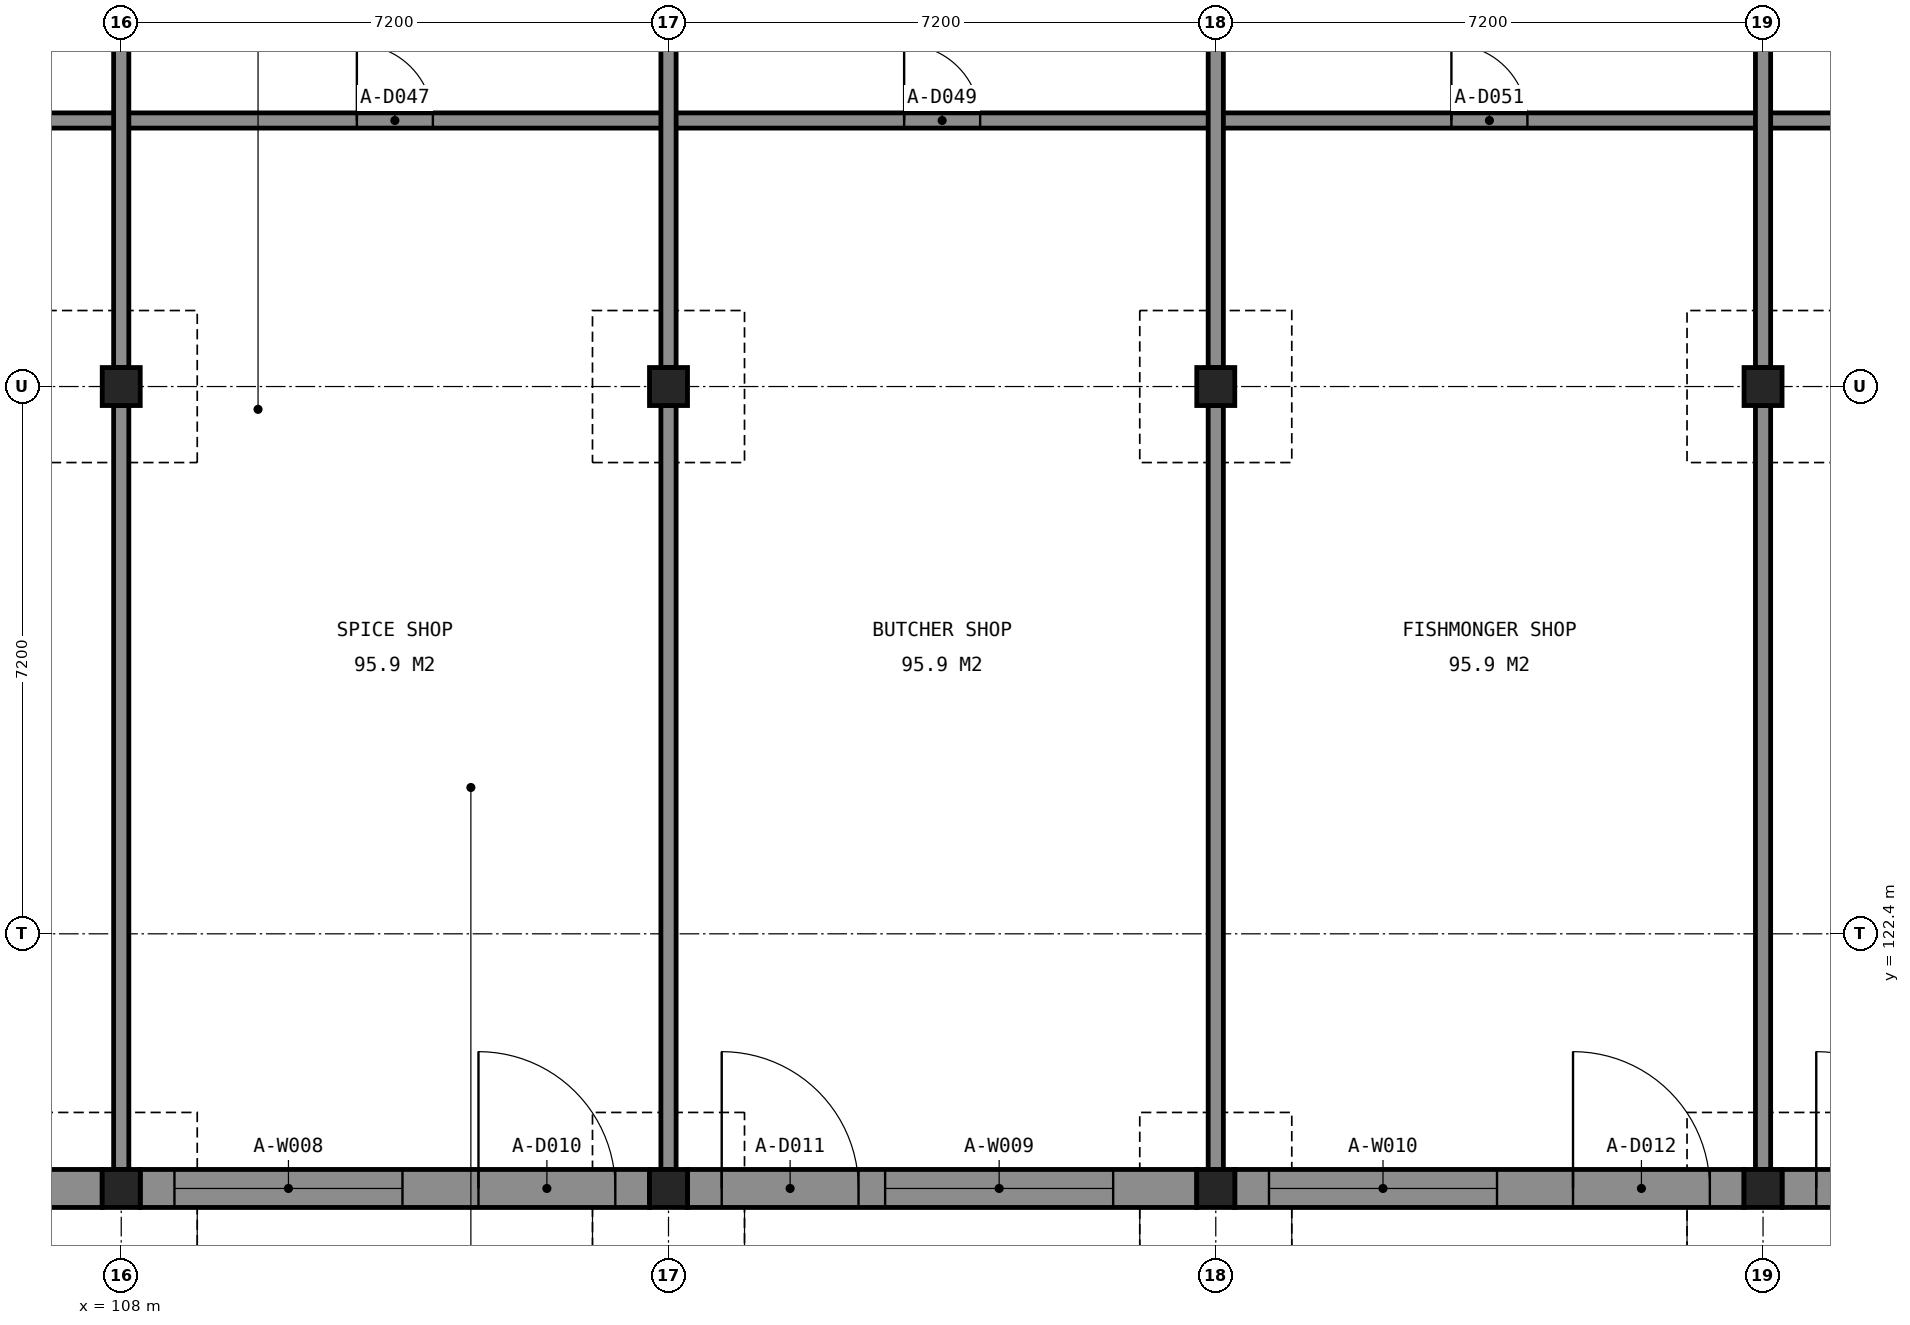
"""IFC4 building model, lengths in metres.
Left out: names, types, materials, properties, quantities, classifications, styles, units other than length and angle.
Written with IfcOpenShell. Run it as: python <this file> out.ifc"""

import sys

from ifc_helpers import new_model, si_unit, direction, frame, frame_2d, origin, origin_2d, place, context, subcontext, project, spatial, rectangle, extrude, element, fill, save


model = new_model("IFC4")
c1 = context("Model", 3, precision=1e-05, world=origin(), true_north=direction((0.0, 1.0)))
c2 = subcontext(c1, "Body", "Model", "MODEL_VIEW")
j1 = project(units=[si_unit("LENGTHUNIT", "METRE"), si_unit("PLANEANGLEUNIT", "RADIAN")], contexts=[c1])
p1 = place(None, origin())
s1 = spatial("IfcSite", under=j1, at=p1, CompositionType="ELEMENT")
p2 = place(p1, origin())
s2 = spatial("IfcBuilding", under=s1, at=p2, CompositionType="ELEMENT")
p3 = place(p2, origin())
s3 = spatial("IfcBuildingStorey", under=s2, at=p3, CompositionType="ELEMENT", Elevation=0.0)
for number, where, z_axis, x_axis in (
    (1, (108.0, 119.05, 0.0), (0.0, 0.0, 1.0), (1.0, 0.0, 0.0)),
    (2, (115.2, 119.05, 0.0), (0.0, 0.0, 1.0), (1.0, 0.0, 0.0)),
    (3, (122.4, 119.05, 0.0), (0.0, 0.0, 1.0), (1.0, 0.0, 0.0)),
    (4, (129.6, 119.05, 0.0), (0.0, 0.0, 1.0), (1.0, 0.0, 0.0)),
    (5, (108.0, 129.6, 0.0), (0.0, 0.0, 1.0), (1.0, 0.0, 0.0)),
    (6, (115.2, 129.6, 0.0), (0.0, 0.0, 1.0), (1.0, 0.0, 0.0)),
    (7, (122.4, 129.6, 0.0), (0.0, 0.0, 1.0), (1.0, 0.0, 0.0)),
    (8, (129.6, 129.6, 0.0), (0.0, 0.0, 1.0), (1.0, 0.0, 0.0)),
):
    element("IfcColumn", number, at=place(p3, frame(where, z_axis=z_axis, x_axis=x_axis)), inside=s3, PredefinedType="COLUMN", context=c2, shape_type="SweptSolid", body=[
        extrude(rectangle(XDim=0.5, YDim=0.5, at=origin_2d()), origin(), (0.0, 0.0, 1.0), 3.7),
    ])
p4 = place(p3, frame((101.05, 119.05, 0.0), z_axis=(0.0, 0.0, 1.0), x_axis=(1.0, 0.0, 0.0)))
e9 = element("IfcWall", 9, at=p4, inside=s3, PredefinedType="SOLIDWALL", context=c2, shape_type="SweptSolid", body=[
    extrude(rectangle(XDim=6.7, YDim=0.5, at=frame_2d((3.35, 0.0))), origin(), (0.0, 0.0, 1.0), 3.6),
])
p5 = place(p4, frame((0.45, 0.0, 0.0)))
e10 = element("IfcOpeningElement", 10, at=p5, cuts=e9, PredefinedType="OPENING", context=c2, shape_type="SweptSolid", body=[
    extrude(rectangle(XDim=1.8, YDim=2.4, at=frame_2d((0.9, 1.2))), frame((0.0, 0.26, 0.0), z_axis=(0.0, -1.0, 0.0), x_axis=(1.0, 0.0, 0.0)), (0.0, 0.0, 1.0), 0.52),
])
p6 = place(p4, frame((2.6, 0.0, 0.6)))
e11 = element("IfcOpeningElement", 11, at=p6, cuts=e9, PredefinedType="OPENING", context=c2, shape_type="SweptSolid", body=[
    extrude(rectangle(XDim=3.0, YDim=2.4, at=frame_2d((1.5, 1.2))), frame((0.0, 0.26, 0.0), z_axis=(0.0, -1.0, 0.0), x_axis=(1.0, 0.0, 0.0)), (0.0, 0.0, 1.0), 0.52),
])
p7 = place(p3, frame((108.25, 119.05, 0.0), z_axis=(0.0, 0.0, 1.0), x_axis=(1.0, 0.0, 0.0)))
e12 = element("IfcWall", 12, at=p7, inside=s3, PredefinedType="SOLIDWALL", context=c2, shape_type="SweptSolid", body=[
    extrude(rectangle(XDim=6.7, YDim=0.5, at=frame_2d((3.35, 0.0))), origin(), (0.0, 0.0, 1.0), 3.6),
])
p8 = place(p7, frame((4.45, 0.0, 0.0)))
e13 = element("IfcOpeningElement", 13, at=p8, cuts=e12, PredefinedType="OPENING", context=c2, shape_type="SweptSolid", body=[
    extrude(rectangle(XDim=1.8, YDim=2.4, at=frame_2d((0.9, 1.2))), frame((0.0, 0.26, 0.0), z_axis=(0.0, -1.0, 0.0), x_axis=(1.0, 0.0, 0.0)), (0.0, 0.0, 1.0), 0.52),
])
p9 = place(p7, frame((0.45, 0.0, 0.6)))
e14 = element("IfcOpeningElement", 14, at=p9, cuts=e12, PredefinedType="OPENING", context=c2, shape_type="SweptSolid", body=[
    extrude(rectangle(XDim=3.0, YDim=2.4, at=frame_2d((1.5, 1.2))), frame((0.0, 0.26, 0.0), z_axis=(0.0, -1.0, 0.0), x_axis=(1.0, 0.0, 0.0)), (0.0, 0.0, 1.0), 0.52),
])
p10 = place(p3, frame((115.45, 119.05, 0.0), z_axis=(0.0, 0.0, 1.0), x_axis=(1.0, 0.0, 0.0)))
e15 = element("IfcWall", 15, at=p10, inside=s3, PredefinedType="SOLIDWALL", context=c2, shape_type="SweptSolid", body=[
    extrude(rectangle(XDim=6.7, YDim=0.5, at=frame_2d((3.35, 0.0))), origin(), (0.0, 0.0, 1.0), 3.6),
])
p11 = place(p10, frame((0.45, 0.0, 0.0)))
e16 = element("IfcOpeningElement", 16, at=p11, cuts=e15, PredefinedType="OPENING", context=c2, shape_type="SweptSolid", body=[
    extrude(rectangle(XDim=1.8, YDim=2.4, at=frame_2d((0.9, 1.2))), frame((0.0, 0.26, 0.0), z_axis=(0.0, -1.0, 0.0), x_axis=(1.0, 0.0, 0.0)), (0.0, 0.0, 1.0), 0.52),
])
p12 = place(p10, frame((2.6, 0.0, 0.6)))
e17 = element("IfcOpeningElement", 17, at=p12, cuts=e15, PredefinedType="OPENING", context=c2, shape_type="SweptSolid", body=[
    extrude(rectangle(XDim=3.0, YDim=2.4, at=frame_2d((1.5, 1.2))), frame((0.0, 0.26, 0.0), z_axis=(0.0, -1.0, 0.0), x_axis=(1.0, 0.0, 0.0)), (0.0, 0.0, 1.0), 0.52),
])
p13 = place(p3, frame((122.65, 119.05, 0.0), z_axis=(0.0, 0.0, 1.0), x_axis=(1.0, 0.0, 0.0)))
e18 = element("IfcWall", 18, at=p13, inside=s3, PredefinedType="SOLIDWALL", context=c2, shape_type="SweptSolid", body=[
    extrude(rectangle(XDim=6.7, YDim=0.5, at=frame_2d((3.35, 0.0))), origin(), (0.0, 0.0, 1.0), 3.6),
])
p14 = place(p13, frame((4.45, 0.0, 0.0)))
e19 = element("IfcOpeningElement", 19, at=p14, cuts=e18, PredefinedType="OPENING", context=c2, shape_type="SweptSolid", body=[
    extrude(rectangle(XDim=1.8, YDim=2.4, at=frame_2d((0.9, 1.2))), frame((0.0, 0.26, 0.0), z_axis=(0.0, -1.0, 0.0), x_axis=(1.0, 0.0, 0.0)), (0.0, 0.0, 1.0), 0.52),
])
p15 = place(p13, frame((0.45, 0.0, 0.6)))
e20 = element("IfcOpeningElement", 20, at=p15, cuts=e18, PredefinedType="OPENING", context=c2, shape_type="SweptSolid", body=[
    extrude(rectangle(XDim=3.0, YDim=2.4, at=frame_2d((1.5, 1.2))), frame((0.0, 0.26, 0.0), z_axis=(0.0, -1.0, 0.0), x_axis=(1.0, 0.0, 0.0)), (0.0, 0.0, 1.0), 0.52),
])
p16 = place(p3, frame((129.85, 119.05, 0.0), z_axis=(0.0, 0.0, 1.0), x_axis=(1.0, 0.0, 0.0)))
e21 = element("IfcWall", 21, at=p16, inside=s3, PredefinedType="SOLIDWALL", context=c2, shape_type="SweptSolid", body=[
    extrude(rectangle(XDim=6.7, YDim=0.5, at=frame_2d((3.35, 0.0))), origin(), (0.0, 0.0, 1.0), 3.6),
])
p17 = place(p16, frame((0.45, 0.0, 0.0)))
e22 = element("IfcOpeningElement", 22, at=p17, cuts=e21, PredefinedType="OPENING", context=c2, shape_type="SweptSolid", body=[
    extrude(rectangle(XDim=1.8, YDim=2.4, at=frame_2d((0.9, 1.2))), frame((0.0, 0.26, 0.0), z_axis=(0.0, -1.0, 0.0), x_axis=(1.0, 0.0, 0.0)), (0.0, 0.0, 1.0), 0.52),
])
p18 = place(p16, frame((2.6, 0.0, 0.6)))
e23 = element("IfcOpeningElement", 23, at=p18, cuts=e21, PredefinedType="OPENING", context=c2, shape_type="SweptSolid", body=[
    extrude(rectangle(XDim=3.0, YDim=2.4, at=frame_2d((1.5, 1.2))), frame((0.0, 0.26, 0.0), z_axis=(0.0, -1.0, 0.0), x_axis=(1.0, 0.0, 0.0)), (0.0, 0.0, 1.0), 0.52),
])
p19 = place(p3, frame((57.7, 133.1, 0.0), z_axis=(0.0, 0.0, 1.0), x_axis=(1.0, 0.0, 0.0)))
e24 = element("IfcWall", 24, at=p19, inside=s3, PredefinedType="PARTITIONING", context=c2, shape_type="SweptSolid", body=[
    extrude(rectangle(XDim=86.2, YDim=0.2, at=frame_2d((43.1, 0.0))), origin(), (0.0, 0.0, 1.0), 3.5),
])
p20 = place(p19, frame((3.0, 0.0, 0.0)))
e25 = element("IfcOpeningElement", 25, at=p20, cuts=e24, PredefinedType="OPENING", context=c2, shape_type="SweptSolid", body=[
    extrude(rectangle(XDim=1.0, YDim=2.1, at=frame_2d((0.5, 1.05))), frame((0.0, 0.11, 0.0), z_axis=(0.0, -1.0, 0.0), x_axis=(1.0, 0.0, 0.0)), (0.0, 0.0, 1.0), 0.22),
])
p21 = place(p19, frame((10.2, 0.0, 0.0)))
e26 = element("IfcOpeningElement", 26, at=p21, cuts=e24, PredefinedType="OPENING", context=c2, shape_type="SweptSolid", body=[
    extrude(rectangle(XDim=1.0, YDim=2.1, at=frame_2d((0.5, 1.05))), frame((0.0, 0.11, 0.0), z_axis=(0.0, -1.0, 0.0), x_axis=(1.0, 0.0, 0.0)), (0.0, 0.0, 1.0), 0.22),
])
p22 = place(p19, frame((17.4, 0.0, 0.0)))
e27 = element("IfcOpeningElement", 27, at=p22, cuts=e24, PredefinedType="OPENING", context=c2, shape_type="SweptSolid", body=[
    extrude(rectangle(XDim=1.0, YDim=2.1, at=frame_2d((0.5, 1.05))), frame((0.0, 0.11, 0.0), z_axis=(0.0, -1.0, 0.0), x_axis=(1.0, 0.0, 0.0)), (0.0, 0.0, 1.0), 0.22),
])
p23 = place(p19, frame((24.6, 0.0, 0.0)))
e28 = element("IfcOpeningElement", 28, at=p23, cuts=e24, PredefinedType="OPENING", context=c2, shape_type="SweptSolid", body=[
    extrude(rectangle(XDim=1.0, YDim=2.1, at=frame_2d((0.5, 1.05))), frame((0.0, 0.11, 0.0), z_axis=(0.0, -1.0, 0.0), x_axis=(1.0, 0.0, 0.0)), (0.0, 0.0, 1.0), 0.22),
])
p24 = place(p19, frame((31.8, 0.0, 0.0)))
e29 = element("IfcOpeningElement", 29, at=p24, cuts=e24, PredefinedType="OPENING", context=c2, shape_type="SweptSolid", body=[
    extrude(rectangle(XDim=1.0, YDim=2.1, at=frame_2d((0.5, 1.05))), frame((0.0, 0.11, 0.0), z_axis=(0.0, -1.0, 0.0), x_axis=(1.0, 0.0, 0.0)), (0.0, 0.0, 1.0), 0.22),
])
p25 = place(p19, frame((39.0, 0.0, 0.0)))
e30 = element("IfcOpeningElement", 30, at=p25, cuts=e24, PredefinedType="OPENING", context=c2, shape_type="SweptSolid", body=[
    extrude(rectangle(XDim=1.0, YDim=2.1, at=frame_2d((0.5, 1.05))), frame((0.0, 0.11, 0.0), z_axis=(0.0, -1.0, 0.0), x_axis=(1.0, 0.0, 0.0)), (0.0, 0.0, 1.0), 0.22),
])
p26 = place(p19, frame((46.2, 0.0, 0.0)))
e31 = element("IfcOpeningElement", 31, at=p26, cuts=e24, PredefinedType="OPENING", context=c2, shape_type="SweptSolid", body=[
    extrude(rectangle(XDim=1.0, YDim=2.1, at=frame_2d((0.5, 1.05))), frame((0.0, 0.11, 0.0), z_axis=(0.0, -1.0, 0.0), x_axis=(1.0, 0.0, 0.0)), (0.0, 0.0, 1.0), 0.22),
])
p27 = place(p19, frame((53.4, 0.0, 0.0)))
e32 = element("IfcOpeningElement", 32, at=p27, cuts=e24, PredefinedType="OPENING", context=c2, shape_type="SweptSolid", body=[
    extrude(rectangle(XDim=1.0, YDim=2.1, at=frame_2d((0.5, 1.05))), frame((0.0, 0.11, 0.0), z_axis=(0.0, -1.0, 0.0), x_axis=(1.0, 0.0, 0.0)), (0.0, 0.0, 1.0), 0.22),
])
p28 = place(p19, frame((60.6, 0.0, 0.0)))
e33 = element("IfcOpeningElement", 33, at=p28, cuts=e24, PredefinedType="OPENING", context=c2, shape_type="SweptSolid", body=[
    extrude(rectangle(XDim=1.0, YDim=2.1, at=frame_2d((0.5, 1.05))), frame((0.0, 0.11, 0.0), z_axis=(0.0, -1.0, 0.0), x_axis=(1.0, 0.0, 0.0)), (0.0, 0.0, 1.0), 0.22),
])
p29 = place(p19, frame((67.8, 0.0, 0.0)))
e34 = element("IfcOpeningElement", 34, at=p29, cuts=e24, PredefinedType="OPENING", context=c2, shape_type="SweptSolid", body=[
    extrude(rectangle(XDim=1.0, YDim=2.1, at=frame_2d((0.5, 1.05))), frame((0.0, 0.11, 0.0), z_axis=(0.0, -1.0, 0.0), x_axis=(1.0, 0.0, 0.0)), (0.0, 0.0, 1.0), 0.22),
])
p30 = place(p19, frame((75.0, 0.0, 0.0)))
e35 = element("IfcOpeningElement", 35, at=p30, cuts=e24, PredefinedType="OPENING", context=c2, shape_type="SweptSolid", body=[
    extrude(rectangle(XDim=1.0, YDim=2.1, at=frame_2d((0.5, 1.05))), frame((0.0, 0.11, 0.0), z_axis=(0.0, -1.0, 0.0), x_axis=(1.0, 0.0, 0.0)), (0.0, 0.0, 1.0), 0.22),
])
p31 = place(p19, frame((84.65, 0.0, 0.0)))
e36 = element("IfcOpeningElement", 36, at=p31, cuts=e24, PredefinedType="OPENING", context=c2, shape_type="SweptSolid", body=[
    extrude(rectangle(XDim=0.9, YDim=2.1, at=frame_2d((0.45, 1.05))), frame((0.0, 0.11, 0.0), z_axis=(0.0, -1.0, 0.0), x_axis=(1.0, 0.0, 0.0)), (0.0, 0.0, 1.0), 0.22),
])
p32 = place(p3, frame((108.0, 119.3, 0.0), z_axis=(0.0, 0.0, 1.0), x_axis=(0.0, 1.0, 0.0)))
e37 = element("IfcWall", 37, at=p32, inside=s3, PredefinedType="PARTITIONING", context=c2, shape_type="SweptSolid", body=[
    extrude(rectangle(XDim=10.05, YDim=0.2, at=frame_2d((5.025, 0.0))), origin(), (0.0, 0.0, 1.0), 3.5),
])
p33 = place(p3, frame((108.0, 129.85, 0.0), z_axis=(0.0, 0.0, 1.0), x_axis=(0.0, 1.0, 0.0)))
e38 = element("IfcWall", 38, at=p33, inside=s3, PredefinedType="PARTITIONING", context=c2, shape_type="SweptSolid", body=[
    extrude(rectangle(XDim=7.95, YDim=0.2, at=frame_2d((3.975, 0.0))), origin(), (0.0, 0.0, 1.0), 3.5),
])
p34 = place(p3, frame((115.2, 119.3, 0.0), z_axis=(0.0, 0.0, 1.0), x_axis=(0.0, 1.0, 0.0)))
e39 = element("IfcWall", 39, at=p34, inside=s3, PredefinedType="PARTITIONING", context=c2, shape_type="SweptSolid", body=[
    extrude(rectangle(XDim=10.05, YDim=0.2, at=frame_2d((5.025, 0.0))), origin(), (0.0, 0.0, 1.0), 3.5),
])
p35 = place(p3, frame((115.2, 129.85, 0.0), z_axis=(0.0, 0.0, 1.0), x_axis=(0.0, 1.0, 0.0)))
e40 = element("IfcWall", 40, at=p35, inside=s3, PredefinedType="PARTITIONING", context=c2, shape_type="SweptSolid", body=[
    extrude(rectangle(XDim=7.95, YDim=0.2, at=frame_2d((3.975, 0.0))), origin(), (0.0, 0.0, 1.0), 3.5),
])
p36 = place(p3, frame((122.4, 119.3, 0.0), z_axis=(0.0, 0.0, 1.0), x_axis=(0.0, 1.0, 0.0)))
e41 = element("IfcWall", 41, at=p36, inside=s3, PredefinedType="PARTITIONING", context=c2, shape_type="SweptSolid", body=[
    extrude(rectangle(XDim=10.05, YDim=0.2, at=frame_2d((5.025, 0.0))), origin(), (0.0, 0.0, 1.0), 3.5),
])
p37 = place(p3, frame((122.4, 129.85, 0.0), z_axis=(0.0, 0.0, 1.0), x_axis=(0.0, 1.0, 0.0)))
e42 = element("IfcWall", 42, at=p37, inside=s3, PredefinedType="PARTITIONING", context=c2, shape_type="SweptSolid", body=[
    extrude(rectangle(XDim=7.95, YDim=0.2, at=frame_2d((3.975, 0.0))), origin(), (0.0, 0.0, 1.0), 3.5),
])
p38 = place(p3, frame((129.6, 119.3, 0.0), z_axis=(0.0, 0.0, 1.0), x_axis=(0.0, 1.0, 0.0)))
e43 = element("IfcWall", 43, at=p38, inside=s3, PredefinedType="PARTITIONING", context=c2, shape_type="SweptSolid", body=[
    extrude(rectangle(XDim=10.05, YDim=0.2, at=frame_2d((5.025, 0.0))), origin(), (0.0, 0.0, 1.0), 3.5),
])
p39 = place(p3, frame((129.6, 129.85, 0.0), z_axis=(0.0, 0.0, 1.0), x_axis=(0.0, 1.0, 0.0)))
e44 = element("IfcWall", 44, at=p39, inside=s3, PredefinedType="PARTITIONING", context=c2, shape_type="SweptSolid", body=[
    extrude(rectangle(XDim=7.95, YDim=0.2, at=frame_2d((3.975, 0.0))), origin(), (0.0, 0.0, 1.0), 3.5),
])
p40 = place(p8, origin())
e45 = element("IfcDoor", 45, at=p40, inside=s3, OperationType="DOUBLE_DOOR_DOUBLE_SWING", PredefinedType="DOOR", context=c2, shape_type="SweptSolid", body=[
    extrude(rectangle(XDim=1.8, YDim=2.4, at=frame_2d((0.9, 1.2))), frame((0.0, 0.025, 0.0), z_axis=(0.0, -1.0, 0.0), x_axis=(1.0, 0.0, 0.0)), (0.0, 0.0, 1.0), 0.05),
])
fill(e13, e45)
p41 = place(p9, origin())
e46 = element("IfcWindow", 46, at=p41, inside=s3, PartitioningType="SINGLE_PANEL", PredefinedType="WINDOW", context=c2, shape_type="SweptSolid", body=[
    extrude(rectangle(XDim=3.0, YDim=2.4, at=frame_2d((1.5, 1.2))), frame((0.0, 0.03, 0.0), z_axis=(0.0, -1.0, 0.0), x_axis=(1.0, 0.0, 0.0)), (0.0, 0.0, 1.0), 0.06),
])
fill(e14, e46)
p42 = place(p11, origin())
e47 = element("IfcDoor", 47, at=p42, inside=s3, OperationType="DOUBLE_DOOR_DOUBLE_SWING", PredefinedType="DOOR", context=c2, shape_type="SweptSolid", body=[
    extrude(rectangle(XDim=1.8, YDim=2.4, at=frame_2d((0.9, 1.2))), frame((0.0, 0.025, 0.0), z_axis=(0.0, -1.0, 0.0), x_axis=(1.0, 0.0, 0.0)), (0.0, 0.0, 1.0), 0.05),
])
fill(e16, e47)
p43 = place(p12, origin())
e48 = element("IfcWindow", 48, at=p43, inside=s3, PartitioningType="SINGLE_PANEL", PredefinedType="WINDOW", context=c2, shape_type="SweptSolid", body=[
    extrude(rectangle(XDim=3.0, YDim=2.4, at=frame_2d((1.5, 1.2))), frame((0.0, 0.03, 0.0), z_axis=(0.0, -1.0, 0.0), x_axis=(1.0, 0.0, 0.0)), (0.0, 0.0, 1.0), 0.06),
])
fill(e17, e48)
p44 = place(p14, origin())
e49 = element("IfcDoor", 49, at=p44, inside=s3, OperationType="DOUBLE_DOOR_DOUBLE_SWING", PredefinedType="DOOR", context=c2, shape_type="SweptSolid", body=[
    extrude(rectangle(XDim=1.8, YDim=2.4, at=frame_2d((0.9, 1.2))), frame((0.0, 0.025, 0.0), z_axis=(0.0, -1.0, 0.0), x_axis=(1.0, 0.0, 0.0)), (0.0, 0.0, 1.0), 0.05),
])
fill(e19, e49)
p45 = place(p15, origin())
e50 = element("IfcWindow", 50, at=p45, inside=s3, PartitioningType="SINGLE_PANEL", PredefinedType="WINDOW", context=c2, shape_type="SweptSolid", body=[
    extrude(rectangle(XDim=3.0, YDim=2.4, at=frame_2d((1.5, 1.2))), frame((0.0, 0.03, 0.0), z_axis=(0.0, -1.0, 0.0), x_axis=(1.0, 0.0, 0.0)), (0.0, 0.0, 1.0), 0.06),
])
fill(e20, e50)
p46 = place(p17, origin())
e51 = element("IfcDoor", 51, at=p46, inside=s3, OperationType="DOUBLE_DOOR_DOUBLE_SWING", PredefinedType="DOOR", context=c2, shape_type="SweptSolid", body=[
    extrude(rectangle(XDim=1.8, YDim=2.4, at=frame_2d((0.9, 1.2))), frame((0.0, 0.025, 0.0), z_axis=(0.0, -1.0, 0.0), x_axis=(1.0, 0.0, 0.0)), (0.0, 0.0, 1.0), 0.05),
])
fill(e22, e51)
p47 = place(p27, origin())
e52 = element("IfcDoor", 52, at=p47, inside=s3, OperationType="SINGLE_SWING_LEFT", PredefinedType="DOOR", context=c2, shape_type="SweptSolid", body=[
    extrude(rectangle(XDim=1.0, YDim=2.1, at=frame_2d((0.5, 1.05))), frame((0.0, 0.025, 0.0), z_axis=(0.0, -1.0, 0.0), x_axis=(1.0, 0.0, 0.0)), (0.0, 0.0, 1.0), 0.05),
])
fill(e32, e52)
p48 = place(p28, origin())
e53 = element("IfcDoor", 53, at=p48, inside=s3, OperationType="SINGLE_SWING_LEFT", PredefinedType="DOOR", context=c2, shape_type="SweptSolid", body=[
    extrude(rectangle(XDim=1.0, YDim=2.1, at=frame_2d((0.5, 1.05))), frame((0.0, 0.025, 0.0), z_axis=(0.0, -1.0, 0.0), x_axis=(1.0, 0.0, 0.0)), (0.0, 0.0, 1.0), 0.05),
])
fill(e33, e53)
p49 = place(p29, origin())
e54 = element("IfcDoor", 54, at=p49, inside=s3, OperationType="SINGLE_SWING_LEFT", PredefinedType="DOOR", context=c2, shape_type="SweptSolid", body=[
    extrude(rectangle(XDim=1.0, YDim=2.1, at=frame_2d((0.5, 1.05))), frame((0.0, 0.025, 0.0), z_axis=(0.0, -1.0, 0.0), x_axis=(1.0, 0.0, 0.0)), (0.0, 0.0, 1.0), 0.05),
])
fill(e34, e54)
save(model, sys.argv[1])
